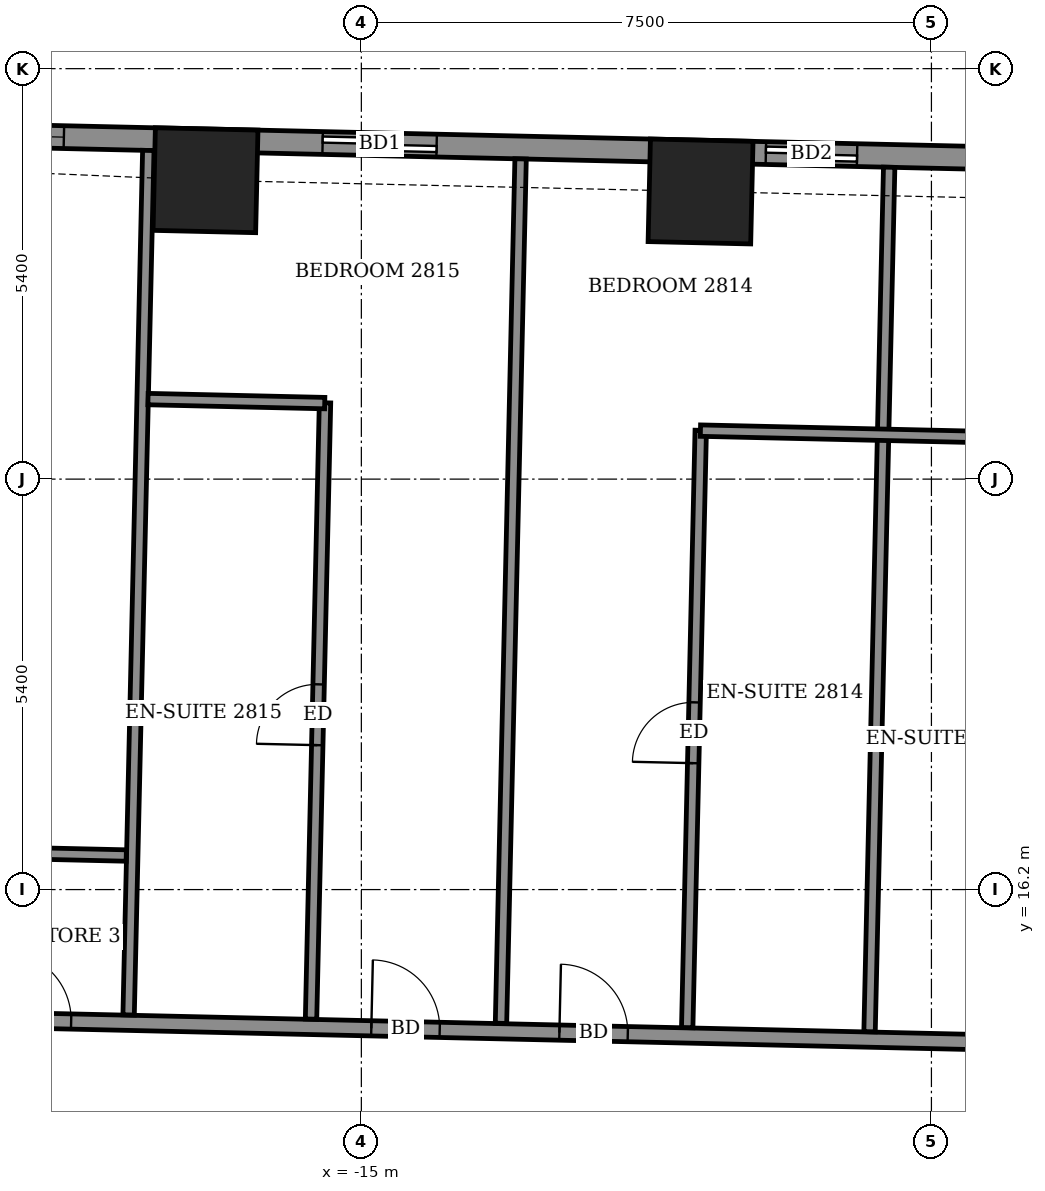
"""IFC4 building model, lengths in metres.
Left out: names, types, materials, properties, quantities, classifications, styles, units other than length and angle.
Written with IfcOpenShell. Run it as: python <this file> out.ifc"""

import sys

from ifc_helpers import new_model, si_unit, direction, frame, frame_2d, origin, origin_2d, place, context, subcontext, project, spatial, rectangle, extrude, element, fill, save


model = new_model("IFC4")
c1 = context("Model", 3, precision=1e-05, world=origin(), true_north=direction((0.0, 1.0)))
c2 = subcontext(c1, "Body", "Model", "MODEL_VIEW")
j1 = project(units=[si_unit("LENGTHUNIT", "METRE"), si_unit("PLANEANGLEUNIT", "RADIAN")], contexts=[c1])
p1 = place(None, origin())
s1 = spatial("IfcSite", under=j1, at=p1, CompositionType="ELEMENT")
p2 = place(p1, origin())
s2 = spatial("IfcBuilding", under=s1, at=p2, CompositionType="ELEMENT")
p3 = place(p2, frame((0.0, 0.0, 112.7)))
s3 = spatial("IfcBuildingStorey", under=s2, at=p3, CompositionType="ELEMENT", Elevation=112.7)
for number, where, z_axis, x_axis in (
    (1, (-10.537, 25.384, -0.55), (0.0, 0.0, 1.0), (-1.0, 0.023, 0.0)),
    (2, (-17.05, 25.532, -0.55), (0.0, 0.0, 1.0), (-1.0, 0.023, 0.0)),
):
    element("IfcColumn", number, at=place(p3, frame(where, z_axis=z_axis, x_axis=x_axis)), inside=s3, PredefinedType="COLUMN", context=c2, shape_type="SweptSolid", body=[
        extrude(rectangle(XDim=1.35, YDim=1.35, at=origin_2d()), origin(), (0.0, 0.0, 1.0), 3.6),
    ])
p4 = place(p3, frame((21.894, 25.173, 0.0), z_axis=(0.0, 0.0, 1.0), x_axis=(-0.999742661083, 0.022685052594, 0.0)))
e3 = element("IfcWall", 3, at=p4, inside=s3, PredefinedType="SOLIDWALL", context=c2, shape_type="SweptSolid", body=[
    extrude(rectangle(XDim=45.309, YDim=0.3, at=frame_2d((22.654, 0.0))), origin(), (0.0, 0.0, 1.0), 3.05),
])
p5 = place(p4, frame((2.495, 0.0, 0.0)))
e4 = element("IfcOpeningElement", 4, at=p5, cuts=e3, PredefinedType="OPENING", context=c2, shape_type="SweptSolid", body=[
    extrude(rectangle(XDim=1.5, YDim=2.4, at=frame_2d((0.75, 1.2))), frame((0.0, 0.16, 0.0), z_axis=(0.0, -1.0, 0.0), x_axis=(1.0, 0.0, 0.0)), (0.0, 0.0, 1.0), 0.32),
])
p6 = place(p4, frame((7.874, 0.0, 0.0)))
e5 = element("IfcOpeningElement", 5, at=p6, cuts=e3, PredefinedType="OPENING", context=c2, shape_type="SweptSolid", body=[
    extrude(rectangle(XDim=1.5, YDim=2.4, at=frame_2d((0.75, 1.2))), frame((0.0, 0.16, 0.0), z_axis=(0.0, -1.0, 0.0), x_axis=(1.0, 0.0, 0.0)), (0.0, 0.0, 1.0), 0.32),
])
p7 = place(p4, frame((13.732, 0.0, 0.0)))
e6 = element("IfcOpeningElement", 6, at=p7, cuts=e3, PredefinedType="OPENING", context=c2, shape_type="SweptSolid", body=[
    extrude(rectangle(XDim=1.2, YDim=2.4, at=frame_2d((0.6, 1.2))), frame((0.0, 0.16, 0.0), z_axis=(0.0, -1.0, 0.0), x_axis=(1.0, 0.0, 0.0)), (0.0, 0.0, 1.0), 0.32),
])
p8 = place(p4, frame((16.415, 0.0, 0.0)))
e7 = element("IfcOpeningElement", 7, at=p8, cuts=e3, PredefinedType="OPENING", context=c2, shape_type="SweptSolid", body=[
    extrude(rectangle(XDim=1.5, YDim=2.4, at=frame_2d((0.75, 1.2))), frame((0.0, 0.16, 0.0), z_axis=(0.0, -1.0, 0.0), x_axis=(1.0, 0.0, 0.0)), (0.0, 0.0, 1.0), 0.32),
])
p9 = place(p4, frame((21.908, 0.0, 0.0)))
e8 = element("IfcOpeningElement", 8, at=p9, cuts=e3, PredefinedType="OPENING", context=c2, shape_type="SweptSolid", body=[
    extrude(rectangle(XDim=1.5, YDim=2.4, at=frame_2d((0.75, 1.2))), frame((0.0, 0.16, 0.0), z_axis=(0.0, -1.0, 0.0), x_axis=(1.0, 0.0, 0.0)), (0.0, 0.0, 1.0), 0.32),
])
p10 = place(p4, frame((27.397, 0.0, 0.0)))
e9 = element("IfcOpeningElement", 9, at=p10, cuts=e3, PredefinedType="OPENING", context=c2, shape_type="SweptSolid", body=[
    extrude(rectangle(XDim=1.5, YDim=2.4, at=frame_2d((0.75, 1.2))), frame((0.0, 0.16, 0.0), z_axis=(0.0, -1.0, 0.0), x_axis=(1.0, 0.0, 0.0)), (0.0, 0.0, 1.0), 0.32),
])
p11 = place(p4, frame((30.38, 0.0, 0.0)))
e10 = element("IfcOpeningElement", 10, at=p11, cuts=e3, PredefinedType="OPENING", context=c2, shape_type="SweptSolid", body=[
    extrude(rectangle(XDim=1.2, YDim=2.4, at=frame_2d((0.6, 1.2))), frame((0.0, 0.16, 0.0), z_axis=(0.0, -1.0, 0.0), x_axis=(1.0, 0.0, 0.0)), (0.0, 0.0, 1.0), 0.32),
])
p12 = place(p4, frame((35.913, 0.0, 0.0)))
e11 = element("IfcOpeningElement", 11, at=p12, cuts=e3, PredefinedType="OPENING", context=c2, shape_type="SweptSolid", body=[
    extrude(rectangle(XDim=1.5, YDim=2.4, at=frame_2d((0.75, 1.2))), frame((0.0, 0.16, 0.0), z_axis=(0.0, -1.0, 0.0), x_axis=(1.0, 0.0, 0.0)), (0.0, 0.0, 1.0), 0.32),
])
p13 = place(p4, frame((40.818, 0.0, 0.9)))
e12 = element("IfcOpeningElement", 12, at=p13, cuts=e3, PredefinedType="OPENING", context=c2, shape_type="SweptSolid", body=[
    extrude(rectangle(XDim=2.4, YDim=1.5, at=frame_2d((1.2, 0.75))), frame((0.0, 0.16, 0.0), z_axis=(0.0, -1.0, 0.0), x_axis=(1.0, 0.0, 0.0)), (0.0, 0.0, 1.0), 0.32),
])
p14 = place(p3, frame((-26.341, 14.635, 0.0), z_axis=(0.0, 0.0, 1.0), x_axis=(0.999742553034, -0.02268981385, 0.0)))
e13 = element("IfcWall", 13, at=p14, inside=s3, PredefinedType="PARTITIONING", context=c2, shape_type="SweptSolid", body=[
    extrude(rectangle(XDim=50.733, YDim=0.2, at=frame_2d((25.366, 0.0))), origin(), (0.0, 0.0, 1.0), 3.05),
])
p15 = place(p14, frame((47.954, 0.0, 0.0)))
e14 = element("IfcOpeningElement", 14, at=p15, cuts=e13, PredefinedType="OPENING", context=c2, shape_type="SweptSolid", body=[
    extrude(rectangle(XDim=1.0, YDim=2.1, at=frame_2d((0.5, 1.05))), frame((0.0, 0.11, 0.0), z_axis=(0.0, -1.0, 0.0), x_axis=(1.0, 0.0, 0.0)), (0.0, 0.0, 1.0), 0.22),
])
p16 = place(p14, frame((43.125, 0.0, 0.0)))
e15 = element("IfcOpeningElement", 15, at=p16, cuts=e13, PredefinedType="OPENING", context=c2, shape_type="SweptSolid", body=[
    extrude(rectangle(XDim=0.9, YDim=2.1, at=frame_2d((0.45, 1.05))), frame((0.0, 0.11, 0.0), z_axis=(0.0, -1.0, 0.0), x_axis=(1.0, 0.0, 0.0)), (0.0, 0.0, 1.0), 0.22),
])
p17 = place(p14, frame((40.7, 0.0, 0.0)))
e16 = element("IfcOpeningElement", 16, at=p17, cuts=e13, PredefinedType="OPENING", context=c2, shape_type="SweptSolid", body=[
    extrude(rectangle(XDim=0.9, YDim=2.1, at=frame_2d((0.45, 1.05))), frame((0.0, 0.11, 0.0), z_axis=(0.0, -1.0, 0.0), x_axis=(1.0, 0.0, 0.0)), (0.0, 0.0, 1.0), 0.22),
])
p18 = place(p14, frame((33.425, 0.0, 0.0)))
e17 = element("IfcOpeningElement", 17, at=p18, cuts=e13, PredefinedType="OPENING", context=c2, shape_type="SweptSolid", body=[
    extrude(rectangle(XDim=0.9, YDim=2.1, at=frame_2d((0.45, 1.05))), frame((0.0, 0.11, 0.0), z_axis=(0.0, -1.0, 0.0), x_axis=(1.0, 0.0, 0.0)), (0.0, 0.0, 1.0), 0.22),
])
p19 = place(p14, frame((30.95, 0.0, 0.0)))
e18 = element("IfcOpeningElement", 18, at=p19, cuts=e13, PredefinedType="OPENING", context=c2, shape_type="SweptSolid", body=[
    extrude(rectangle(XDim=0.9, YDim=2.1, at=frame_2d((0.45, 1.05))), frame((0.0, 0.11, 0.0), z_axis=(0.0, -1.0, 0.0), x_axis=(1.0, 0.0, 0.0)), (0.0, 0.0, 1.0), 0.22),
])
p20 = place(p14, frame((23.675, 0.0, 0.0)))
e19 = element("IfcOpeningElement", 19, at=p20, cuts=e13, PredefinedType="OPENING", context=c2, shape_type="SweptSolid", body=[
    extrude(rectangle(XDim=0.9, YDim=2.1, at=frame_2d((0.45, 1.05))), frame((0.0, 0.11, 0.0), z_axis=(0.0, -1.0, 0.0), x_axis=(1.0, 0.0, 0.0)), (0.0, 0.0, 1.0), 0.22),
])
p21 = place(p14, frame((21.2, 0.0, 0.0)))
e20 = element("IfcOpeningElement", 20, at=p21, cuts=e13, PredefinedType="OPENING", context=c2, shape_type="SweptSolid", body=[
    extrude(rectangle(XDim=0.9, YDim=2.1, at=frame_2d((0.45, 1.05))), frame((0.0, 0.11, 0.0), z_axis=(0.0, -1.0, 0.0), x_axis=(1.0, 0.0, 0.0)), (0.0, 0.0, 1.0), 0.22),
])
p22 = place(p14, frame((13.95, 0.0, 0.0)))
e21 = element("IfcOpeningElement", 21, at=p22, cuts=e13, PredefinedType="OPENING", context=c2, shape_type="SweptSolid", body=[
    extrude(rectangle(XDim=0.9, YDim=2.1, at=frame_2d((0.45, 1.05))), frame((0.0, 0.11, 0.0), z_axis=(0.0, -1.0, 0.0), x_axis=(1.0, 0.0, 0.0)), (0.0, 0.0, 1.0), 0.22),
])
p23 = place(p14, frame((11.475, 0.0, 0.0)))
e22 = element("IfcOpeningElement", 22, at=p23, cuts=e13, PredefinedType="OPENING", context=c2, shape_type="SweptSolid", body=[
    extrude(rectangle(XDim=0.9, YDim=2.1, at=frame_2d((0.45, 1.05))), frame((0.0, 0.11, 0.0), z_axis=(0.0, -1.0, 0.0), x_axis=(1.0, 0.0, 0.0)), (0.0, 0.0, 1.0), 0.22),
])
p24 = place(p14, frame((1.4, 0.0, 0.0)))
e23 = element("IfcOpeningElement", 23, at=p24, cuts=e13, PredefinedType="OPENING", context=c2, shape_type="SweptSolid", body=[
    extrude(rectangle(XDim=1.0, YDim=2.1, at=frame_2d((0.5, 1.05))), frame((0.0, 0.11, 0.0), z_axis=(0.0, -1.0, 0.0), x_axis=(1.0, 0.0, 0.0)), (0.0, 0.0, 1.0), 0.22),
])
p25 = place(p14, frame((6.625, 0.0, 0.0)))
e24 = element("IfcOpeningElement", 24, at=p25, cuts=e13, PredefinedType="OPENING", context=c2, shape_type="SweptSolid", body=[
    extrude(rectangle(XDim=0.9, YDim=2.1, at=frame_2d((0.45, 1.05))), frame((0.0, 0.11, 0.0), z_axis=(0.0, -1.0, 0.0), x_axis=(1.0, 0.0, 0.0)), (0.0, 0.0, 1.0), 0.22),
])
p26 = place(p3, frame((-18.062, 14.551, 0.0), z_axis=(0.0, 0.0, 1.0), x_axis=(0.022770155219, 0.999740726404, 0.0)))
e25 = element("IfcWall", 25, at=p26, inside=s3, PredefinedType="PARTITIONING", context=c2, shape_type="SweptSolid", body=[
    extrude(rectangle(XDim=11.376, YDim=0.15, at=frame_2d((5.688, 0.0))), origin(), (0.0, 0.0, 1.0), 2.55),
])
p27 = place(p3, frame((-15.662, 14.496, 0.0), z_axis=(0.0, 0.0, 1.0), x_axis=(0.022698155442, 0.999742363682, 0.0)))
e26 = element("IfcWall", 26, at=p27, inside=s3, PredefinedType="PARTITIONING", context=c2, shape_type="SweptSolid", body=[
    extrude(rectangle(XDim=8.11, YDim=0.15, at=frame_2d((4.055, 0.0))), origin(), (0.0, 0.0, 1.0), 3.05),
])
p28 = place(p27, frame((3.605, 0.0, 0.0)))
e27 = element("IfcOpeningElement", 27, at=p28, cuts=e26, PredefinedType="OPENING", context=c2, shape_type="SweptSolid", body=[
    extrude(rectangle(XDim=0.8, YDim=2.1, at=frame_2d((0.4, 1.05))), frame((0.0, 0.085, 0.0), z_axis=(0.0, -1.0, 0.0), x_axis=(1.0, 0.0, 0.0)), (0.0, 0.0, 1.0), 0.17),
])
p29 = place(p3, frame((-13.163, 14.44, 0.0), z_axis=(0.0, 0.0, 1.0), x_axis=(0.022684355347, 0.999742676904, 0.0)))
e28 = element("IfcWall", 28, at=p29, inside=s3, PredefinedType="PARTITIONING", context=c2, shape_type="SweptSolid", body=[
    extrude(rectangle(XDim=11.376, YDim=0.15, at=frame_2d((5.688, 0.0))), origin(), (0.0, 0.0, 1.0), 2.55),
])
p30 = place(p3, frame((-10.713, 14.384, 0.0), z_axis=(0.0, 0.0, 1.0), x_axis=(0.022643791768, 0.999743596476, 0.0)))
e29 = element("IfcWall", 29, at=p30, inside=s3, PredefinedType="PARTITIONING", context=c2, shape_type="SweptSolid", body=[
    extrude(rectangle(XDim=7.86, YDim=0.15, at=frame_2d((3.93, 0.0))), origin(), (0.0, 0.0, 1.0), 3.05),
])
p31 = place(p30, frame((3.48, 0.0, 0.0)))
e30 = element("IfcOpeningElement", 30, at=p31, cuts=e29, PredefinedType="OPENING", context=c2, shape_type="SweptSolid", body=[
    extrude(rectangle(XDim=0.8, YDim=2.1, at=frame_2d((0.4, 1.05))), frame((0.0, 0.085, 0.0), z_axis=(0.0, -1.0, 0.0), x_axis=(1.0, 0.0, 0.0)), (0.0, 0.0, 1.0), 0.17),
])
p32 = place(p3, frame((-8.314, 14.33, 0.0), z_axis=(0.0, 0.0, 1.0), x_axis=(0.022684842063, 0.99974266586, 0.0)))
e31 = element("IfcWall", 31, at=p32, inside=s3, PredefinedType="PARTITIONING", context=c2, shape_type="SweptSolid", body=[
    extrude(rectangle(XDim=11.376, YDim=0.15, at=frame_2d((5.688, 0.0))), origin(), (0.0, 0.0, 1.0), 2.55),
])
p33 = place(p3, frame((-20.417, 16.701, 0.0), z_axis=(0.0, 0.0, 1.0), x_axis=(0.999740260747, -0.02279059109, 0.0)))
e32 = element("IfcWall", 32, at=p33, inside=s3, PredefinedType="PARTITIONING", context=c2, shape_type="SweptSolid", body=[
    extrude(rectangle(XDim=2.324, YDim=0.15, at=frame_2d((1.162, 0.0))), origin(), (0.0, 0.0, 1.0), 3.05),
])
p34 = place(p3, frame((-10.539, 22.238, 0.0), z_axis=(0.0, 0.0, 1.0), x_axis=(0.99974154664, -0.022734113616, 0.0)))
e33 = element("IfcWall", 33, at=p34, inside=s3, PredefinedType="PARTITIONING", context=c2, shape_type="SweptSolid", body=[
    extrude(rectangle(XDim=4.8, YDim=0.15, at=frame_2d((2.4, 0.0))), origin(), (0.0, 0.0, 1.0), 3.05),
])
p35 = place(p3, frame((-17.807, 22.653, 0.0), z_axis=(0.0, 0.0, 1.0), x_axis=(0.999740478815, -0.022781023197, 0.0)))
e34 = element("IfcWall", 34, at=p35, inside=s3, PredefinedType="PARTITIONING", context=c2, shape_type="SweptSolid", body=[
    extrude(rectangle(XDim=2.325, YDim=0.15, at=frame_2d((1.163, 0.0))), origin(), (0.0, 0.0, 1.0), 3.05),
])
p36 = place(p11, origin())
e35 = element("IfcDoor", 35, at=p36, inside=s3, OperationType="SLIDING_TO_LEFT", PredefinedType="DOOR", context=c2, shape_type="SweptSolid", body=[
    extrude(rectangle(XDim=1.2, YDim=2.4, at=frame_2d((0.6, 1.2))), frame((0.0, 0.025, 0.0), z_axis=(0.0, -1.0, 0.0), x_axis=(1.0, 0.0, 0.0)), (0.0, 0.0, 1.0), 0.05),
])
fill(e10, e35)
p37 = place(p12, origin())
e36 = element("IfcDoor", 36, at=p37, inside=s3, OperationType="SLIDING_TO_LEFT", PredefinedType="DOOR", context=c2, shape_type="SweptSolid", body=[
    extrude(rectangle(XDim=1.5, YDim=2.4, at=frame_2d((0.75, 1.2))), frame((0.0, 0.025, 0.0), z_axis=(0.0, -1.0, 0.0), x_axis=(1.0, 0.0, 0.0)), (0.0, 0.0, 1.0), 0.05),
])
fill(e11, e36)
p38 = place(p13, origin())
e37 = element("IfcWindow", 37, at=p38, inside=s3, PartitioningType="DOUBLE_PANEL_VERTICAL", PredefinedType="WINDOW", context=c2, shape_type="SweptSolid", body=[
    extrude(rectangle(XDim=2.4, YDim=1.5, at=frame_2d((1.2, 0.75))), frame((0.0, 0.03, 0.0), z_axis=(0.0, -1.0, 0.0), x_axis=(1.0, 0.0, 0.0)), (0.0, 0.0, 1.0), 0.06),
])
fill(e12, e37)
p39 = place(p22, origin())
e38 = element("IfcDoor", 38, at=p39, inside=s3, OperationType="SINGLE_SWING_RIGHT", PredefinedType="DOOR", context=c2, shape_type="SweptSolid", body=[
    extrude(rectangle(XDim=0.9, YDim=2.1, at=frame_2d((0.45, 1.05))), frame((0.0, 0.025, 0.0), z_axis=(0.0, -1.0, 0.0), x_axis=(1.0, 0.0, 0.0)), (0.0, 0.0, 1.0), 0.05),
])
fill(e21, e38)
p40 = place(p31, origin())
e39 = element("IfcDoor", 39, at=p40, inside=s3, OperationType="SINGLE_SWING_RIGHT", PredefinedType="DOOR", context=c2, shape_type="SweptSolid", body=[
    extrude(rectangle(XDim=0.8, YDim=2.1, at=frame_2d((0.4, 1.05))), frame((0.0, 0.025, 0.0), z_axis=(0.0, -1.0, 0.0), x_axis=(1.0, 0.0, 0.0)), (0.0, 0.0, 1.0), 0.05),
])
fill(e30, e39)
p41 = place(p23, origin())
e40 = element("IfcDoor", 40, at=p41, inside=s3, OperationType="SINGLE_SWING_LEFT", PredefinedType="DOOR", context=c2, shape_type="SweptSolid", body=[
    extrude(rectangle(XDim=0.9, YDim=2.1, at=frame_2d((0.45, 1.05))), frame((0.0, 0.025, 0.0), z_axis=(0.0, -1.0, 0.0), x_axis=(1.0, 0.0, 0.0)), (0.0, 0.0, 1.0), 0.05),
])
fill(e22, e40)
p42 = place(p28, origin())
e41 = element("IfcDoor", 41, at=p42, inside=s3, OperationType="SINGLE_SWING_LEFT", PredefinedType="DOOR", context=c2, shape_type="SweptSolid", body=[
    extrude(rectangle(XDim=0.8, YDim=2.1, at=frame_2d((0.4, 1.05))), frame((0.0, 0.025, 0.0), z_axis=(0.0, -1.0, 0.0), x_axis=(1.0, 0.0, 0.0)), (0.0, 0.0, 1.0), 0.05),
])
fill(e27, e41)
p43 = place(p25, origin())
e42 = element("IfcDoor", 42, at=p43, inside=s3, OperationType="SINGLE_SWING_LEFT", PredefinedType="DOOR", context=c2, shape_type="SweptSolid", body=[
    extrude(rectangle(XDim=0.9, YDim=2.1, at=frame_2d((0.45, 1.05))), frame((0.0, 0.025, 0.0), z_axis=(0.0, -1.0, 0.0), x_axis=(1.0, 0.0, 0.0)), (0.0, 0.0, 1.0), 0.05),
])
fill(e24, e42)
save(model, sys.argv[1])
